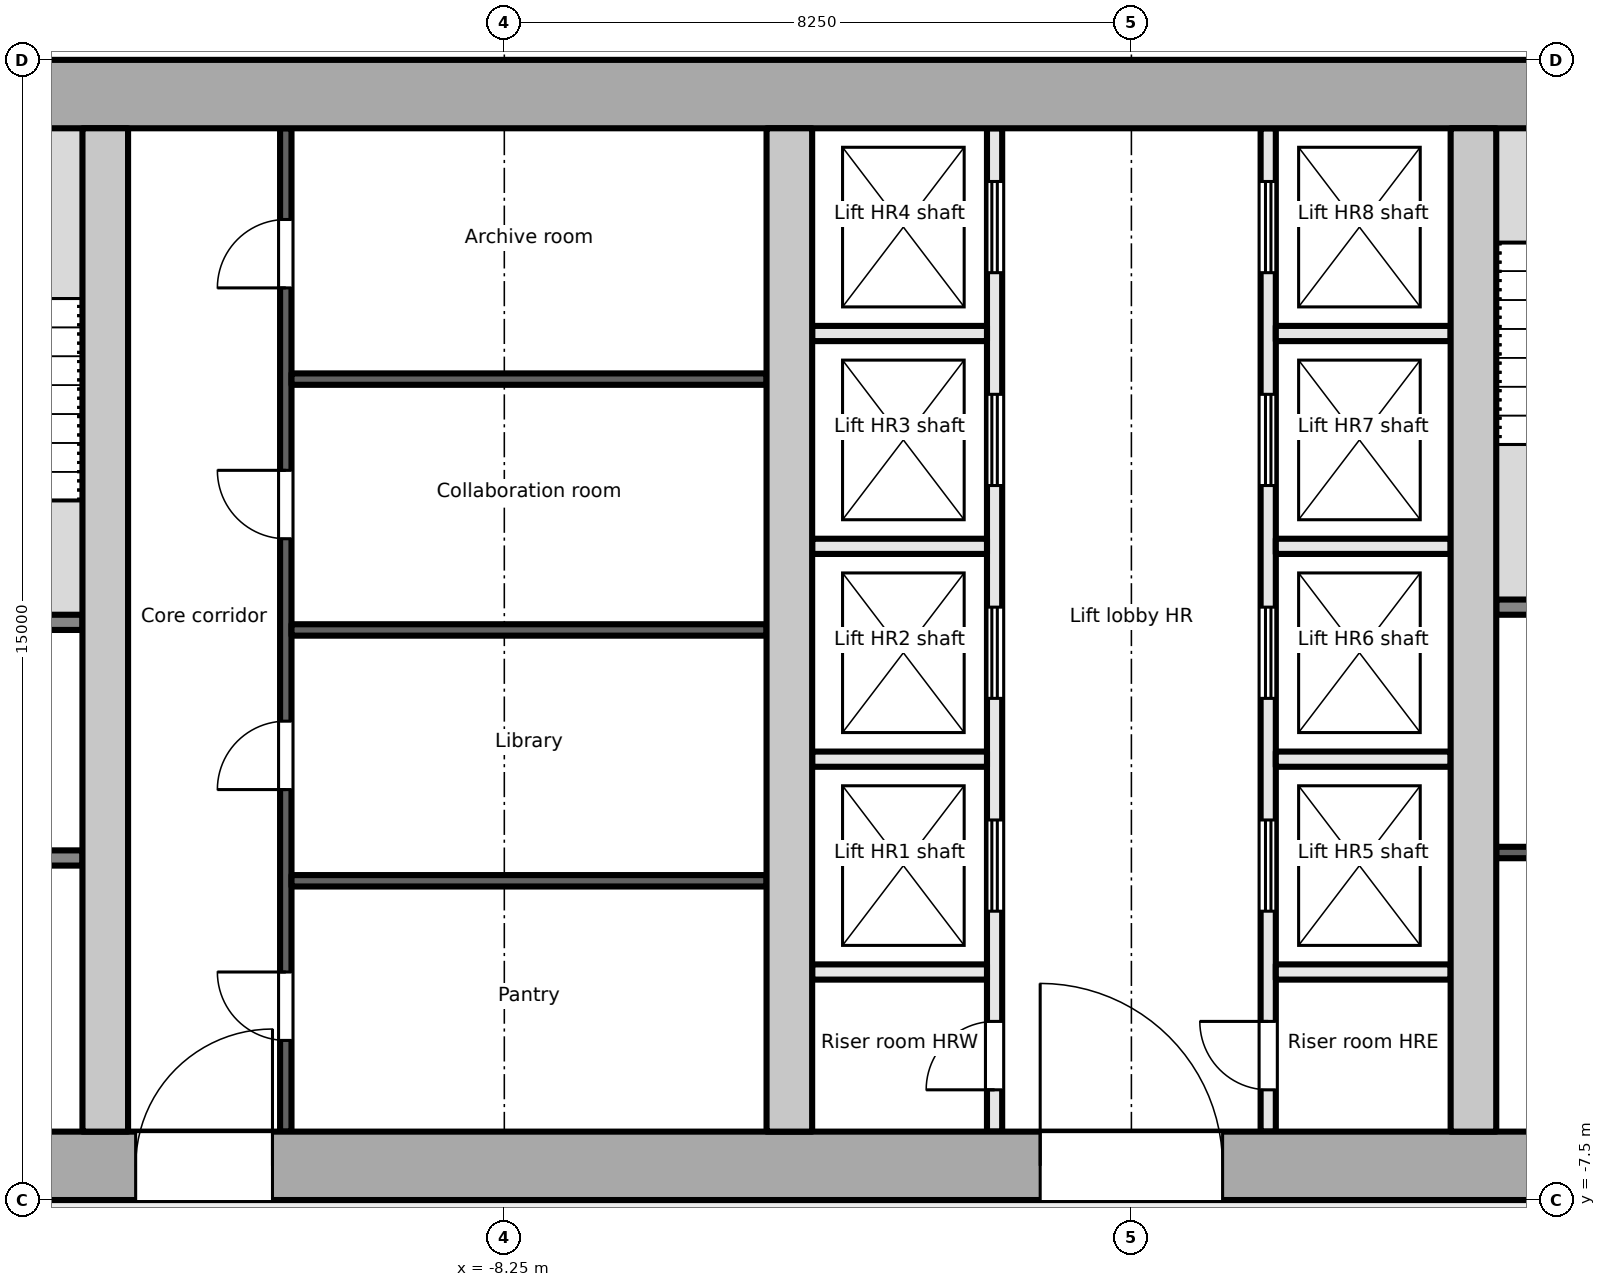
"""IFC4 building model, lengths in metres.
Left out: names, types, materials, properties, quantities, classifications, styles, units other than length and angle.
Written with IfcOpenShell. Run it as: python <this file> out.ifc"""

import sys

from ifc_helpers import new_model, si_unit, direction, frame, frame_2d, origin, place, context, subcontext, project, spatial, rectangle, extrude, element, fill, save


model = new_model("IFC4")
c1 = context("Model", 3, precision=1e-05, world=origin(), true_north=direction((0.0, 1.0)))
c2 = subcontext(c1, "Body", "Model", "MODEL_VIEW")
j1 = project(units=[si_unit("LENGTHUNIT", "METRE"), si_unit("PLANEANGLEUNIT", "RADIAN")], contexts=[c1])
p1 = place(None, origin())
s1 = spatial("IfcSite", under=j1, at=p1, CompositionType="ELEMENT")
p2 = place(p1, origin())
s2 = spatial("IfcBuilding", under=s1, at=p2, CompositionType="ELEMENT")
p3 = place(p2, frame((0.0, 0.0, 249.7)))
s3 = spatial("IfcBuildingStorey", under=s2, at=p3, CompositionType="ELEMENT", Elevation=249.7)
p4 = place(p3, frame((-18.0, -7.05, -0.2), z_axis=(0.0, 0.0, 1.0), x_axis=(1.0, 0.0, 0.0)))
e1 = element("IfcWall", 1, at=p4, inside=s3, PredefinedType="SHEAR", context=c2, shape_type="SweptSolid", body=[
    extrude(rectangle(XDim=36.0, YDim=0.9, at=frame_2d((18.0, 0.0))), origin(), (0.0, 0.0, 1.0), 5.4),
])
p5 = place(p4, frame((4.9, 0.0, 0.2)))
e2 = element("IfcOpeningElement", 2, at=p5, cuts=e1, PredefinedType="OPENING", context=c2, shape_type="SweptSolid", body=[
    extrude(rectangle(XDim=1.8, YDim=2.1, at=frame_2d((0.9, 1.05))), frame((0.0, 0.46, 0.0), z_axis=(0.0, -1.0, 0.0), x_axis=(1.0, 0.0, 0.0)), (0.0, 0.0, 1.0), 0.921),
])
p6 = place(p4, frame((16.8, 0.0, 0.2)))
e3 = element("IfcOpeningElement", 3, at=p6, cuts=e1, PredefinedType="OPENING", context=c2, shape_type="SweptSolid", body=[
    extrude(rectangle(XDim=2.4, YDim=2.1, at=frame_2d((1.2, 1.05))), frame((0.0, 0.46, 0.0), z_axis=(0.0, -1.0, 0.0), x_axis=(1.0, 0.0, 0.0)), (0.0, 0.0, 1.0), 0.921),
])
p7 = place(p4, frame((26.1, 0.0, 0.2)))
e4 = element("IfcOpeningElement", 4, at=p7, cuts=e1, PredefinedType="OPENING", context=c2, shape_type="SweptSolid", body=[
    extrude(rectangle(XDim=2.4, YDim=2.1, at=frame_2d((1.2, 1.05))), frame((0.0, 0.46, 0.0), z_axis=(0.0, -1.0, 0.0), x_axis=(1.0, 0.0, 0.0)), (0.0, 0.0, 1.0), 0.921),
])
p8 = place(p3, frame((-18.0, 7.05, -0.2), z_axis=(0.0, 0.0, 1.0), x_axis=(1.0, 0.0, 0.0)))
e5 = element("IfcWall", 5, at=p8, inside=s3, PredefinedType="SHEAR", context=c2, shape_type="SweptSolid", body=[
    extrude(rectangle(XDim=36.0, YDim=0.9, at=frame_2d((18.0, 0.0))), origin(), (0.0, 0.0, 1.0), 5.4),
])
for number, where, z_axis, x_axis in (
    (6, (-13.5, -6.6, -0.2), (0.0, 0.0, 1.0), (0.0, 1.0, 0.0)),
    (7, (-4.5, -6.6, -0.2), (0.0, 0.0, 1.0), (0.0, 1.0, 0.0)),
    (8, (4.5, -6.6, -0.2), (0.0, 0.0, 1.0), (0.0, 1.0, 0.0)),
):
    element("IfcWall", number, at=place(p3, frame(where, z_axis=z_axis, x_axis=x_axis)), inside=s3, PredefinedType="SHEAR", context=c2, shape_type="SweptSolid", body=[
        extrude(rectangle(XDim=13.2, YDim=0.6, at=frame_2d((6.6, 0.0))), origin(), (0.0, 0.0, 1.0), 5.4),
    ])
p9 = place(p3, frame((-17.1, -3.0, 0.0), z_axis=(0.0, 0.0, 1.0), x_axis=(1.0, 0.0, 0.0)))
e9 = element("IfcWall", 9, at=p9, inside=s3, PredefinedType="PARTITIONING", context=c2, shape_type="SweptSolid", body=[
    extrude(rectangle(XDim=3.3, YDim=0.2, at=frame_2d((1.65, 0.0))), origin(), (0.0, 0.0, 1.0), 5.2),
])
p10 = place(p9, frame((1.1, 0.0, 0.0)))
e10 = element("IfcOpeningElement", 10, at=p10, cuts=e9, PredefinedType="OPENING", context=c2, shape_type="SweptSolid", body=[
    extrude(rectangle(XDim=1.1, YDim=2.1, at=frame_2d((0.55, 1.05))), frame((0.0, 0.111, 0.0), z_axis=(0.0, -1.0, 0.0), x_axis=(1.0, 0.0, 0.0)), (0.0, 0.0, 1.0), 0.221),
])
p11 = place(p3, frame((-17.1, 0.1, 0.0), z_axis=(0.0, 0.0, 1.0), x_axis=(1.0, 0.0, 0.0)))
e11 = element("IfcWall", 11, at=p11, inside=s3, PredefinedType="PARTITIONING", context=c2, shape_type="SweptSolid", body=[
    extrude(rectangle(XDim=3.3, YDim=0.2, at=frame_2d((1.65, 0.0))), origin(), (0.0, 0.0, 1.0), 5.2),
])
p12 = place(p11, frame((1.1, 0.0, 0.0)))
e12 = element("IfcOpeningElement", 12, at=p12, cuts=e11, PredefinedType="OPENING", context=c2, shape_type="SweptSolid", body=[
    extrude(rectangle(XDim=1.1, YDim=2.1, at=frame_2d((0.55, 1.05))), frame((0.0, 0.111, 0.0), z_axis=(0.0, -1.0, 0.0), x_axis=(1.0, 0.0, 0.0)), (0.0, 0.0, 1.0), 0.221),
])
p13 = place(p3, frame((-11.125, -6.6, 0.0), z_axis=(0.0, 0.0, 1.0), x_axis=(0.0, 1.0, 0.0)))
e13 = element("IfcWall", 13, at=p13, inside=s3, PredefinedType="PARTITIONING", context=c2, shape_type="SweptSolid", body=[
    extrude(rectangle(XDim=13.2, YDim=0.15, at=frame_2d((6.6, 0.0))), origin(), (0.0, 0.0, 1.0), 5.2),
])
p14 = place(p13, frame((1.2, 0.0, 0.0)))
e14 = element("IfcOpeningElement", 14, at=p14, cuts=e13, PredefinedType="OPENING", context=c2, shape_type="SweptSolid", body=[
    extrude(rectangle(XDim=0.9, YDim=2.1, at=frame_2d((0.45, 1.05))), frame((0.0, 0.085, 0.0), z_axis=(0.0, -1.0, 0.0), x_axis=(1.0, 0.0, 0.0)), (0.0, 0.0, 1.0), 0.171),
])
p15 = place(p13, frame((4.5, 0.0, 0.0)))
e15 = element("IfcOpeningElement", 15, at=p15, cuts=e13, PredefinedType="OPENING", context=c2, shape_type="SweptSolid", body=[
    extrude(rectangle(XDim=0.9, YDim=2.1, at=frame_2d((0.45, 1.05))), frame((0.0, 0.085, 0.0), z_axis=(0.0, -1.0, 0.0), x_axis=(1.0, 0.0, 0.0)), (0.0, 0.0, 1.0), 0.171),
])
p16 = place(p13, frame((7.8, 0.0, 0.0)))
e16 = element("IfcOpeningElement", 16, at=p16, cuts=e13, PredefinedType="OPENING", context=c2, shape_type="SweptSolid", body=[
    extrude(rectangle(XDim=0.9, YDim=2.1, at=frame_2d((0.45, 1.05))), frame((0.0, 0.085, 0.0), z_axis=(0.0, -1.0, 0.0), x_axis=(1.0, 0.0, 0.0)), (0.0, 0.0, 1.0), 0.171),
])
p17 = place(p13, frame((11.1, 0.0, 0.0)))
e17 = element("IfcOpeningElement", 17, at=p17, cuts=e13, PredefinedType="OPENING", context=c2, shape_type="SweptSolid", body=[
    extrude(rectangle(XDim=0.9, YDim=2.1, at=frame_2d((0.45, 1.05))), frame((0.0, 0.085, 0.0), z_axis=(0.0, -1.0, 0.0), x_axis=(1.0, 0.0, 0.0)), (0.0, 0.0, 1.0), 0.171),
])
for number, where, z_axis, x_axis in (
    (18, (-11.05, -3.3, 0.0), (0.0, 0.0, 1.0), (1.0, 0.0, 0.0)),
    (19, (-11.05, 0.0, 0.0), (0.0, 0.0, 1.0), (1.0, 0.0, 0.0)),
    (20, (-11.05, 3.3, 0.0), (0.0, 0.0, 1.0), (1.0, 0.0, 0.0)),
):
    element("IfcWall", number, at=place(p3, frame(where, z_axis=z_axis, x_axis=x_axis)), inside=s3, PredefinedType="PARTITIONING", context=c2, shape_type="SweptSolid", body=[
        extrude(rectangle(XDim=6.25, YDim=0.15, at=frame_2d((3.125, 0.0))), origin(), (0.0, 0.0, 1.0), 5.2),
    ])
p18 = place(p3, frame((-1.8, -6.6, 0.0), z_axis=(0.0, 0.0, 1.0), x_axis=(0.0, 1.0, 0.0)))
e21 = element("IfcWall", 21, at=p18, inside=s3, PredefinedType="PARTITIONING", context=c2, shape_type="SweptSolid", body=[
    extrude(rectangle(XDim=13.2, YDim=0.2, at=frame_2d((6.6, 0.0))), origin(), (0.0, 0.0, 1.0), 5.2),
])
p19 = place(p18, frame((0.55, 0.0, 0.0)))
e22 = element("IfcOpeningElement", 22, at=p19, cuts=e21, PredefinedType="OPENING", context=c2, shape_type="SweptSolid", body=[
    extrude(rectangle(XDim=0.9, YDim=2.1, at=frame_2d((0.45, 1.05))), frame((0.0, 0.111, 0.0), z_axis=(0.0, -1.0, 0.0), x_axis=(1.0, 0.0, 0.0)), (0.0, 0.0, 1.0), 0.221),
])
p20 = place(p18, frame((2.9, 0.0, 0.0)))
e23 = element("IfcOpeningElement", 23, at=p20, cuts=e21, PredefinedType="OPENING", context=c2, shape_type="SweptSolid", body=[
    extrude(rectangle(XDim=1.2, YDim=2.1, at=frame_2d((0.6, 1.05))), frame((0.0, 0.111, 0.0), z_axis=(0.0, -1.0, 0.0), x_axis=(1.0, 0.0, 0.0)), (0.0, 0.0, 1.0), 0.221),
])
p21 = place(p18, frame((5.7, 0.0, 0.0)))
e24 = element("IfcOpeningElement", 24, at=p21, cuts=e21, PredefinedType="OPENING", context=c2, shape_type="SweptSolid", body=[
    extrude(rectangle(XDim=1.2, YDim=2.1, at=frame_2d((0.6, 1.05))), frame((0.0, 0.111, 0.0), z_axis=(0.0, -1.0, 0.0), x_axis=(1.0, 0.0, 0.0)), (0.0, 0.0, 1.0), 0.221),
])
p22 = place(p18, frame((8.5, 0.0, 0.0)))
e25 = element("IfcOpeningElement", 25, at=p22, cuts=e21, PredefinedType="OPENING", context=c2, shape_type="SweptSolid", body=[
    extrude(rectangle(XDim=1.2, YDim=2.1, at=frame_2d((0.6, 1.05))), frame((0.0, 0.111, 0.0), z_axis=(0.0, -1.0, 0.0), x_axis=(1.0, 0.0, 0.0)), (0.0, 0.0, 1.0), 0.221),
])
p23 = place(p18, frame((11.3, 0.0, 0.0)))
e26 = element("IfcOpeningElement", 26, at=p23, cuts=e21, PredefinedType="OPENING", context=c2, shape_type="SweptSolid", body=[
    extrude(rectangle(XDim=1.2, YDim=2.1, at=frame_2d((0.6, 1.05))), frame((0.0, 0.111, 0.0), z_axis=(0.0, -1.0, 0.0), x_axis=(1.0, 0.0, 0.0)), (0.0, 0.0, 1.0), 0.221),
])
p24 = place(p3, frame((1.8, -6.6, 0.0), z_axis=(0.0, 0.0, 1.0), x_axis=(0.0, 1.0, 0.0)))
e27 = element("IfcWall", 27, at=p24, inside=s3, PredefinedType="PARTITIONING", context=c2, shape_type="SweptSolid", body=[
    extrude(rectangle(XDim=13.2, YDim=0.2, at=frame_2d((6.6, 0.0))), origin(), (0.0, 0.0, 1.0), 5.2),
])
p25 = place(p24, frame((0.55, 0.0, 0.0)))
e28 = element("IfcOpeningElement", 28, at=p25, cuts=e27, PredefinedType="OPENING", context=c2, shape_type="SweptSolid", body=[
    extrude(rectangle(XDim=0.9, YDim=2.1, at=frame_2d((0.45, 1.05))), frame((0.0, 0.111, 0.0), z_axis=(0.0, -1.0, 0.0), x_axis=(1.0, 0.0, 0.0)), (0.0, 0.0, 1.0), 0.221),
])
p26 = place(p24, frame((2.9, 0.0, 0.0)))
e29 = element("IfcOpeningElement", 29, at=p26, cuts=e27, PredefinedType="OPENING", context=c2, shape_type="SweptSolid", body=[
    extrude(rectangle(XDim=1.2, YDim=2.1, at=frame_2d((0.6, 1.05))), frame((0.0, 0.111, 0.0), z_axis=(0.0, -1.0, 0.0), x_axis=(1.0, 0.0, 0.0)), (0.0, 0.0, 1.0), 0.221),
])
p27 = place(p24, frame((5.7, 0.0, 0.0)))
e30 = element("IfcOpeningElement", 30, at=p27, cuts=e27, PredefinedType="OPENING", context=c2, shape_type="SweptSolid", body=[
    extrude(rectangle(XDim=1.2, YDim=2.1, at=frame_2d((0.6, 1.05))), frame((0.0, 0.111, 0.0), z_axis=(0.0, -1.0, 0.0), x_axis=(1.0, 0.0, 0.0)), (0.0, 0.0, 1.0), 0.221),
])
p28 = place(p24, frame((8.5, 0.0, 0.0)))
e31 = element("IfcOpeningElement", 31, at=p28, cuts=e27, PredefinedType="OPENING", context=c2, shape_type="SweptSolid", body=[
    extrude(rectangle(XDim=1.2, YDim=2.1, at=frame_2d((0.6, 1.05))), frame((0.0, 0.111, 0.0), z_axis=(0.0, -1.0, 0.0), x_axis=(1.0, 0.0, 0.0)), (0.0, 0.0, 1.0), 0.221),
])
p29 = place(p24, frame((11.3, 0.0, 0.0)))
e32 = element("IfcOpeningElement", 32, at=p29, cuts=e27, PredefinedType="OPENING", context=c2, shape_type="SweptSolid", body=[
    extrude(rectangle(XDim=1.2, YDim=2.1, at=frame_2d((0.6, 1.05))), frame((0.0, 0.111, 0.0), z_axis=(0.0, -1.0, 0.0), x_axis=(1.0, 0.0, 0.0)), (0.0, 0.0, 1.0), 0.221),
])
for number, where, z_axis, x_axis in (
    (33, (-4.2, -1.7, 0.0), (0.0, 0.0, 1.0), (1.0, 0.0, 0.0)),
    (34, (-4.2, 1.1, 0.0), (0.0, 0.0, 1.0), (1.0, 0.0, 0.0)),
    (35, (-4.2, 3.9, 0.0), (0.0, 0.0, 1.0), (1.0, 0.0, 0.0)),
    (36, (-4.2, -4.5, 0.0), (0.0, 0.0, 1.0), (1.0, 0.0, 0.0)),
    (37, (1.9, -1.7, 0.0), (0.0, 0.0, 1.0), (1.0, 0.0, 0.0)),
    (38, (1.9, 1.1, 0.0), (0.0, 0.0, 1.0), (1.0, 0.0, 0.0)),
    (39, (1.9, 3.9, 0.0), (0.0, 0.0, 1.0), (1.0, 0.0, 0.0)),
    (40, (1.9, -4.5, 0.0), (0.0, 0.0, 1.0), (1.0, 0.0, 0.0)),
):
    element("IfcWall", number, at=place(p3, frame(where, z_axis=z_axis, x_axis=x_axis)), inside=s3, PredefinedType="PARTITIONING", context=c2, shape_type="SweptSolid", body=[
        extrude(rectangle(XDim=2.3, YDim=0.2, at=frame_2d((1.15, 0.0))), origin(), (0.0, 0.0, 1.0), 5.2),
    ])
p30 = place(p3, frame((4.8, 0.3, 0.0), z_axis=(0.0, 0.0, 1.0), x_axis=(1.0, 0.0, 0.0)))
e41 = element("IfcWall", 41, at=p30, inside=s3, PredefinedType="PARTITIONING", context=c2, shape_type="SweptSolid", body=[
    extrude(rectangle(XDim=3.15, YDim=0.2, at=frame_2d((1.575, 0.0))), origin(), (0.0, 0.0, 1.0), 5.2),
])
p31 = place(p3, frame((4.8, -2.928, 0.0), z_axis=(0.0, 0.0, 1.0), x_axis=(1.0, 0.0, 0.0)))
e42 = element("IfcWall", 42, at=p31, inside=s3, PredefinedType="PARTITIONING", context=c2, shape_type="SweptSolid", body=[
    extrude(rectangle(XDim=3.15, YDim=0.15, at=frame_2d((1.575, 0.0))), origin(), (0.0, 0.0, 1.0), 5.2),
])
p32 = place(p14, origin())
e43 = element("IfcDoor", 43, at=p32, inside=s3, OperationType="SINGLE_SWING_RIGHT", PredefinedType="DOOR", context=c2, shape_type="SweptSolid", body=[
    extrude(rectangle(XDim=0.9, YDim=2.1, at=frame_2d((0.45, 1.05))), frame((0.0, 0.025, 0.0), z_axis=(0.0, -1.0, 0.0), x_axis=(1.0, 0.0, 0.0)), (0.0, 0.0, 1.0), 0.05),
])
fill(e14, e43)
p33 = place(p15, origin())
e44 = element("IfcDoor", 44, at=p33, inside=s3, OperationType="SINGLE_SWING_LEFT", PredefinedType="DOOR", context=c2, shape_type="SweptSolid", body=[
    extrude(rectangle(XDim=0.9, YDim=2.1, at=frame_2d((0.45, 1.05))), frame((0.0, 0.025, 0.0), z_axis=(0.0, -1.0, 0.0), x_axis=(1.0, 0.0, 0.0)), (0.0, 0.0, 1.0), 0.05),
])
fill(e15, e44)
p34 = place(p16, origin())
e45 = element("IfcDoor", 45, at=p34, inside=s3, OperationType="SINGLE_SWING_RIGHT", PredefinedType="DOOR", context=c2, shape_type="SweptSolid", body=[
    extrude(rectangle(XDim=0.9, YDim=2.1, at=frame_2d((0.45, 1.05))), frame((0.0, 0.025, 0.0), z_axis=(0.0, -1.0, 0.0), x_axis=(1.0, 0.0, 0.0)), (0.0, 0.0, 1.0), 0.05),
])
fill(e16, e45)
p35 = place(p17, origin())
e46 = element("IfcDoor", 46, at=p35, inside=s3, OperationType="SINGLE_SWING_LEFT", PredefinedType="DOOR", context=c2, shape_type="SweptSolid", body=[
    extrude(rectangle(XDim=0.9, YDim=2.1, at=frame_2d((0.45, 1.05))), frame((0.0, 0.025, 0.0), z_axis=(0.0, -1.0, 0.0), x_axis=(1.0, 0.0, 0.0)), (0.0, 0.0, 1.0), 0.05),
])
fill(e17, e46)
p36 = place(p5, origin())
e47 = element("IfcDoor", 47, at=p36, inside=s3, OperationType="SINGLE_SWING_RIGHT", PredefinedType="DOOR", context=c2, shape_type="SweptSolid", body=[
    extrude(rectangle(XDim=1.8, YDim=2.1, at=frame_2d((0.9, 1.05))), frame((0.0, 0.025, 0.0), z_axis=(0.0, -1.0, 0.0), x_axis=(1.0, 0.0, 0.0)), (0.0, 0.0, 1.0), 0.05),
])
fill(e2, e47)
p37 = place(p19, origin())
e48 = element("IfcDoor", 48, at=p37, inside=s3, OperationType="SINGLE_SWING_LEFT", PredefinedType="DOOR", context=c2, shape_type="SweptSolid", body=[
    extrude(rectangle(XDim=0.9, YDim=2.1, at=frame_2d((0.45, 1.05))), frame((0.0, 0.025, 0.0), z_axis=(0.0, -1.0, 0.0), x_axis=(1.0, 0.0, 0.0)), (0.0, 0.0, 1.0), 0.05),
])
fill(e22, e48)
p38 = place(p20, origin())
e49 = element("IfcDoor", 49, at=p38, inside=s3, OperationType="DOUBLE_DOOR_SLIDING", PredefinedType="DOOR", context=c2, shape_type="SweptSolid", body=[
    extrude(rectangle(XDim=1.2, YDim=2.1, at=frame_2d((0.6, 1.05))), frame((0.0, 0.025, 0.0), z_axis=(0.0, -1.0, 0.0), x_axis=(1.0, 0.0, 0.0)), (0.0, 0.0, 1.0), 0.05),
])
fill(e23, e49)
p39 = place(p21, origin())
e50 = element("IfcDoor", 50, at=p39, inside=s3, OperationType="DOUBLE_DOOR_SLIDING", PredefinedType="DOOR", context=c2, shape_type="SweptSolid", body=[
    extrude(rectangle(XDim=1.2, YDim=2.1, at=frame_2d((0.6, 1.05))), frame((0.0, 0.025, 0.0), z_axis=(0.0, -1.0, 0.0), x_axis=(1.0, 0.0, 0.0)), (0.0, 0.0, 1.0), 0.05),
])
fill(e24, e50)
p40 = place(p22, origin())
e51 = element("IfcDoor", 51, at=p40, inside=s3, OperationType="DOUBLE_DOOR_SLIDING", PredefinedType="DOOR", context=c2, shape_type="SweptSolid", body=[
    extrude(rectangle(XDim=1.2, YDim=2.1, at=frame_2d((0.6, 1.05))), frame((0.0, 0.025, 0.0), z_axis=(0.0, -1.0, 0.0), x_axis=(1.0, 0.0, 0.0)), (0.0, 0.0, 1.0), 0.05),
])
fill(e25, e51)
p41 = place(p23, origin())
e52 = element("IfcDoor", 52, at=p41, inside=s3, OperationType="DOUBLE_DOOR_SLIDING", PredefinedType="DOOR", context=c2, shape_type="SweptSolid", body=[
    extrude(rectangle(XDim=1.2, YDim=2.1, at=frame_2d((0.6, 1.05))), frame((0.0, 0.025, 0.0), z_axis=(0.0, -1.0, 0.0), x_axis=(1.0, 0.0, 0.0)), (0.0, 0.0, 1.0), 0.05),
])
fill(e26, e52)
p42 = place(p25, origin())
e53 = element("IfcDoor", 53, at=p42, inside=s3, OperationType="SINGLE_SWING_RIGHT", PredefinedType="DOOR", context=c2, shape_type="SweptSolid", body=[
    extrude(rectangle(XDim=0.9, YDim=2.1, at=frame_2d((0.45, 1.05))), frame((0.0, 0.025, 0.0), z_axis=(0.0, -1.0, 0.0), x_axis=(1.0, 0.0, 0.0)), (0.0, 0.0, 1.0), 0.05),
])
fill(e28, e53)
p43 = place(p26, origin())
e54 = element("IfcDoor", 54, at=p43, inside=s3, OperationType="DOUBLE_DOOR_SLIDING", PredefinedType="DOOR", context=c2, shape_type="SweptSolid", body=[
    extrude(rectangle(XDim=1.2, YDim=2.1, at=frame_2d((0.6, 1.05))), frame((0.0, 0.025, 0.0), z_axis=(0.0, -1.0, 0.0), x_axis=(1.0, 0.0, 0.0)), (0.0, 0.0, 1.0), 0.05),
])
fill(e29, e54)
p44 = place(p27, origin())
e55 = element("IfcDoor", 55, at=p44, inside=s3, OperationType="DOUBLE_DOOR_SLIDING", PredefinedType="DOOR", context=c2, shape_type="SweptSolid", body=[
    extrude(rectangle(XDim=1.2, YDim=2.1, at=frame_2d((0.6, 1.05))), frame((0.0, 0.025, 0.0), z_axis=(0.0, -1.0, 0.0), x_axis=(1.0, 0.0, 0.0)), (0.0, 0.0, 1.0), 0.05),
])
fill(e30, e55)
p45 = place(p28, origin())
e56 = element("IfcDoor", 56, at=p45, inside=s3, OperationType="DOUBLE_DOOR_SLIDING", PredefinedType="DOOR", context=c2, shape_type="SweptSolid", body=[
    extrude(rectangle(XDim=1.2, YDim=2.1, at=frame_2d((0.6, 1.05))), frame((0.0, 0.025, 0.0), z_axis=(0.0, -1.0, 0.0), x_axis=(1.0, 0.0, 0.0)), (0.0, 0.0, 1.0), 0.05),
])
fill(e31, e56)
p46 = place(p29, origin())
e57 = element("IfcDoor", 57, at=p46, inside=s3, OperationType="DOUBLE_DOOR_SLIDING", PredefinedType="DOOR", context=c2, shape_type="SweptSolid", body=[
    extrude(rectangle(XDim=1.2, YDim=2.1, at=frame_2d((0.6, 1.05))), frame((0.0, 0.025, 0.0), z_axis=(0.0, -1.0, 0.0), x_axis=(1.0, 0.0, 0.0)), (0.0, 0.0, 1.0), 0.05),
])
fill(e32, e57)
p47 = place(p6, origin())
e58 = element("IfcDoor", 58, at=p47, inside=s3, OperationType="DOUBLE_DOOR_DOUBLE_SWING", PredefinedType="DOOR", context=c2, shape_type="SweptSolid", body=[
    extrude(rectangle(XDim=2.4, YDim=2.1, at=frame_2d((1.2, 1.05))), frame((0.0, 0.025, 0.0), z_axis=(0.0, -1.0, 0.0), x_axis=(1.0, 0.0, 0.0)), (0.0, 0.0, 1.0), 0.05),
])
fill(e3, e58)
save(model, sys.argv[1])
